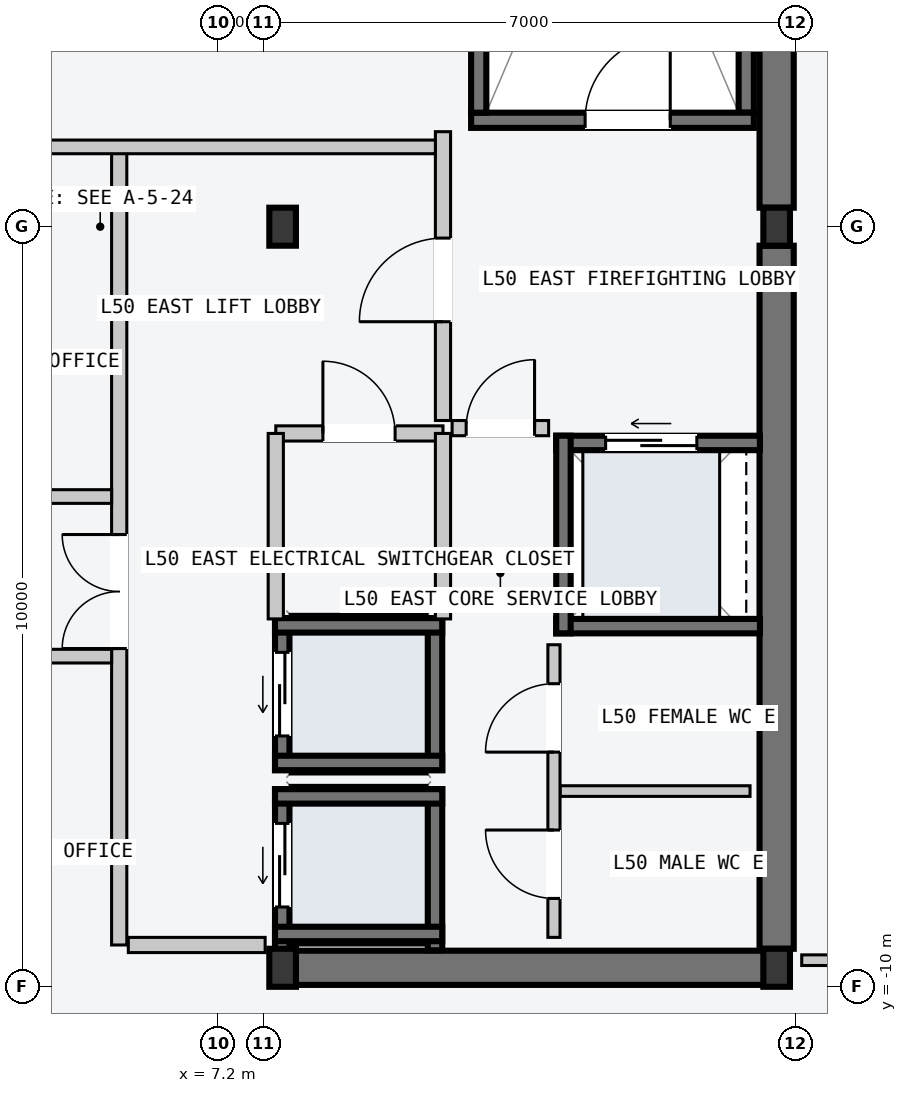
"""IFC4 building model, lengths in metres.
Left out: names, types, materials, properties, quantities, classifications, styles, units other than length and angle.
Written with IfcOpenShell. Run it as: python <this file> out.ifc"""

import sys

from ifc_helpers import new_model, si_unit, direction, frame, frame_2d, origin, origin_2d, place, context, subcontext, project, spatial, rectangle, i_section, extrude, element, fill, save


model = new_model("IFC4")
c1 = context("Model", 3, precision=1e-05, world=origin(), true_north=direction((0.0, 1.0)))
c2 = subcontext(c1, "Body", "Model", "MODEL_VIEW")
j1 = project(units=[si_unit("LENGTHUNIT", "METRE"), si_unit("PLANEANGLEUNIT", "RADIAN")], contexts=[c1])
p1 = place(None, origin())
s1 = spatial("IfcSite", under=j1, at=p1, CompositionType="ELEMENT")
p2 = place(p1, origin())
s2 = spatial("IfcBuilding", under=s1, at=p2, CompositionType="ELEMENT")
p3 = place(p2, frame((0.0, 0.0, 191.1)))
s3 = spatial("IfcBuildingStorey", under=s2, at=p3, CompositionType="ELEMENT", Elevation=191.1)
p4 = place(p3, frame((8.07, -9.75, -0.2), z_axis=(0.0, 0.0, 1.0), x_axis=(1.0, 0.0, 0.0)))
e1 = element("IfcWall", 1, at=p4, inside=s3, PredefinedType="SHEAR", context=c2, shape_type="SweptSolid", body=[
    extrude(rectangle(XDim=6.46, YDim=0.45, at=frame_2d((3.23, 0.0))), origin(), (0.0, 0.0, 1.0), 3.6),
])
for number, where, z_axis, x_axis in (
    (2, (14.55, -9.5, -0.2), (0.0, 0.0, 1.0), (0.0, 1.0, 0.0)),
    (3, (14.55, 0.25, -0.2), (0.0, 0.0, 1.0), (0.0, 1.0, 0.0)),
):
    element("IfcWall", number, at=place(p3, frame(where, z_axis=z_axis, x_axis=x_axis)), inside=s3, PredefinedType="SHEAR", context=c2, shape_type="SweptSolid", body=[
        extrude(rectangle(XDim=9.25, YDim=0.45, at=frame_2d((4.625, 0.0))), origin(), (0.0, 0.0, 1.0), 3.6),
    ])
p5 = place(p3, frame((14.15, 1.5, -0.2), z_axis=(0.0, 0.0, 1.0), x_axis=(0.0, 1.0, 0.0)))
e4 = element("IfcWall", 4, at=p5, inside=s3, PredefinedType="SOLIDWALL", context=c2, shape_type="SweptSolid", body=[
    extrude(rectangle(XDim=7.8, YDim=0.2, at=frame_2d((3.9, 0.0))), origin(), (0.0, 0.0, 1.0), 3.6),
])
p6 = place(p3, frame((10.53, 1.4, -0.2), z_axis=(0.0, 0.0, 1.0), x_axis=(1.0, 0.0, 0.0)))
e5 = element("IfcWall", 5, at=p6, inside=s3, PredefinedType="SOLIDWALL", context=c2, shape_type="SweptSolid", body=[
    extrude(rectangle(XDim=3.72, YDim=0.2, at=frame_2d((1.86, 0.0))), origin(), (0.0, 0.0, 1.0), 3.6),
])
p7 = place(p6, frame((1.5, 0.0, 0.2)))
e6 = element("IfcOpeningElement", 6, at=p7, cuts=e5, PredefinedType="OPENING", context=c2, shape_type="SweptSolid", body=[
    extrude(rectangle(XDim=1.12, YDim=2.18, at=frame_2d((0.56, 1.09))), frame((0.0, 0.11, 0.0), z_axis=(0.0, -1.0, 0.0), x_axis=(1.0, 0.0, 0.0)), (0.0, 0.0, 1.0), 0.22),
])
p8 = place(p3, frame((10.63, 1.5, -0.2), z_axis=(0.0, 0.0, 1.0), x_axis=(0.0, 1.0, 0.0)))
e7 = element("IfcWall", 7, at=p8, inside=s3, PredefinedType="SOLIDWALL", context=c2, shape_type="SweptSolid", body=[
    extrude(rectangle(XDim=7.8, YDim=0.2, at=frame_2d((3.9, 0.0))), origin(), (0.0, 0.0, 1.0), 3.6),
])
for number, where, z_axis, x_axis in (
    (8, (8.05, -9.75, 0.0), (0.0, 0.0, 1.0), (1.0, 0.0, 0.0)),
    (9, (8.05, 0.0, 0.0), (0.0, 0.0, 1.0), (1.0, 0.0, 0.0)),
    (10, (14.55, -9.75, 0.0), (0.0, 0.0, 1.0), (1.0, 0.0, 0.0)),
    (11, (14.55, 0.0, 0.0), (0.0, 0.0, 1.0), (1.0, 0.0, 0.0)),
):
    element("IfcColumn", number, at=place(p3, frame(where, z_axis=z_axis, x_axis=x_axis)), inside=s3, PredefinedType="COLUMN", context=c2, shape_type="SweptSolid", body=[
        extrude(i_section(OverallWidth=0.35, OverallDepth=0.5, WebThickness=0.02, FlangeThickness=0.032, at=origin_2d()), origin(), (0.0, 0.0, 1.0), 3.6),
    ])
p9 = place(p3, frame((8.045, -9.52, -0.2), z_axis=(0.0, 0.0, 1.0), x_axis=(0.0, 1.0, 0.0)))
e12 = element("IfcWall", 12, at=p9, inside=s3, PredefinedType="SOLIDWALL", context=c2, shape_type="SweptSolid", body=[
    extrude(rectangle(XDim=2.12, YDim=0.19, at=frame_2d((1.06, 0.0))), origin(), (0.0, 0.0, 1.0), 3.6),
])
p10 = place(p9, frame((0.57, 0.0, 0.2)))
e13 = element("IfcOpeningElement", 13, at=p10, cuts=e12, PredefinedType="OPENING", context=c2, shape_type="SweptSolid", body=[
    extrude(rectangle(XDim=1.1, YDim=2.2, at=frame_2d((0.55, 1.1))), frame((0.0, 0.105, 0.0), z_axis=(0.0, -1.0, 0.0), x_axis=(1.0, 0.0, 0.0)), (0.0, 0.0, 1.0), 0.21),
])
p11 = place(p3, frame((10.055, -9.52, -0.2), z_axis=(0.0, 0.0, 1.0), x_axis=(0.0, 1.0, 0.0)))
e14 = element("IfcWall", 14, at=p11, inside=s3, PredefinedType="SOLIDWALL", context=c2, shape_type="SweptSolid", body=[
    extrude(rectangle(XDim=2.12, YDim=0.19, at=frame_2d((1.06, 0.0))), origin(), (0.0, 0.0, 1.0), 3.6),
])
for number, where, z_axis, x_axis in (
    (15, (7.95, -7.495, -0.2), (0.0, 0.0, 1.0), (1.0, 0.0, 0.0)),
    (16, (7.95, -9.305, -0.2), (0.0, 0.0, 1.0), (1.0, 0.0, 0.0)),
):
    element("IfcWall", number, at=place(p3, frame(where, z_axis=z_axis, x_axis=x_axis)), inside=s3, PredefinedType="SOLIDWALL", context=c2, shape_type="SweptSolid", body=[
        extrude(rectangle(XDim=2.2, YDim=0.19, at=frame_2d((1.1, 0.0))), origin(), (0.0, 0.0, 1.0), 3.6),
    ])
p12 = place(p3, frame((8.045, -7.15, -0.2), z_axis=(0.0, 0.0, 1.0), x_axis=(0.0, 1.0, 0.0)))
e17 = element("IfcWall", 17, at=p12, inside=s3, PredefinedType="SOLIDWALL", context=c2, shape_type="SweptSolid", body=[
    extrude(rectangle(XDim=2.0, YDim=0.19, at=frame_2d((1.0, 0.0))), origin(), (0.0, 0.0, 1.0), 3.6),
])
p13 = place(p12, frame((0.45, 0.0, 0.2)))
e18 = element("IfcOpeningElement", 18, at=p13, cuts=e17, PredefinedType="OPENING", context=c2, shape_type="SweptSolid", body=[
    extrude(rectangle(XDim=1.1, YDim=2.2, at=frame_2d((0.55, 1.1))), frame((0.0, 0.105, 0.0), z_axis=(0.0, -1.0, 0.0), x_axis=(1.0, 0.0, 0.0)), (0.0, 0.0, 1.0), 0.21),
])
p14 = place(p3, frame((10.055, -7.15, -0.2), z_axis=(0.0, 0.0, 1.0), x_axis=(0.0, 1.0, 0.0)))
e19 = element("IfcWall", 19, at=p14, inside=s3, PredefinedType="SOLIDWALL", context=c2, shape_type="SweptSolid", body=[
    extrude(rectangle(XDim=2.0, YDim=0.19, at=frame_2d((1.0, 0.0))), origin(), (0.0, 0.0, 1.0), 3.6),
])
for number, where, z_axis, x_axis in (
    (20, (7.95, -5.245, -0.2), (0.0, 0.0, 1.0), (1.0, 0.0, 0.0)),
    (21, (7.95, -7.055, -0.2), (0.0, 0.0, 1.0), (1.0, 0.0, 0.0)),
):
    element("IfcWall", number, at=place(p3, frame(where, z_axis=z_axis, x_axis=x_axis)), inside=s3, PredefinedType="SOLIDWALL", context=c2, shape_type="SweptSolid", body=[
        extrude(rectangle(XDim=2.2, YDim=0.19, at=frame_2d((1.1, 0.0))), origin(), (0.0, 0.0, 1.0), 3.6),
    ])
p15 = place(p3, frame((11.65, -2.845, -0.2), z_axis=(0.0, 0.0, 1.0), x_axis=(1.0, 0.0, 0.0)))
e22 = element("IfcWall", 22, at=p15, inside=s3, PredefinedType="SOLIDWALL", context=c2, shape_type="SweptSolid", body=[
    extrude(rectangle(XDim=2.68, YDim=0.19, at=frame_2d((1.34, 0.0))), origin(), (0.0, 0.0, 1.0), 3.6),
])
p16 = place(p15, frame((0.65, 0.0, 0.2)))
e23 = element("IfcOpeningElement", 23, at=p16, cuts=e22, PredefinedType="OPENING", context=c2, shape_type="SweptSolid", body=[
    extrude(rectangle(XDim=1.2, YDim=2.2, at=frame_2d((0.6, 1.1))), frame((0.0, 0.105, 0.0), z_axis=(0.0, -1.0, 0.0), x_axis=(1.0, 0.0, 0.0)), (0.0, 0.0, 1.0), 0.21),
])
p17 = place(p3, frame((11.65, -5.255, -0.2), z_axis=(0.0, 0.0, 1.0), x_axis=(1.0, 0.0, 0.0)))
e24 = element("IfcWall", 24, at=p17, inside=s3, PredefinedType="SOLIDWALL", context=c2, shape_type="SweptSolid", body=[
    extrude(rectangle(XDim=2.68, YDim=0.19, at=frame_2d((1.34, 0.0))), origin(), (0.0, 0.0, 1.0), 3.6),
])
p18 = place(p3, frame((11.745, -5.35, -0.2), z_axis=(0.0, 0.0, 1.0), x_axis=(0.0, 1.0, 0.0)))
e25 = element("IfcWall", 25, at=p18, inside=s3, PredefinedType="SOLIDWALL", context=c2, shape_type="SweptSolid", body=[
    extrude(rectangle(XDim=2.6, YDim=0.19, at=frame_2d((1.3, 0.0))), origin(), (0.0, 0.0, 1.0), 3.6),
])
p19 = place(p3, frame((5.9, -9.45, 0.0), z_axis=(0.0, 0.0, 1.0), x_axis=(0.0, 1.0, 0.0)))
e26 = element("IfcWall", 26, at=p19, inside=s3, PredefinedType="PARTITIONING", context=c2, shape_type="SweptSolid", body=[
    extrude(rectangle(XDim=10.5, YDim=0.2, at=frame_2d((5.25, 0.0))), origin(), (0.0, 0.0, 1.0), 3.4),
])
p20 = place(p19, frame((3.9, 0.0, 0.0)))
e27 = element("IfcOpeningElement", 27, at=p20, cuts=e26, PredefinedType="OPENING", context=c2, shape_type="SweptSolid", body=[
    extrude(rectangle(XDim=1.5, YDim=2.2, at=frame_2d((0.75, 1.1))), frame((0.0, 0.11, 0.0), z_axis=(0.0, -1.0, 0.0), x_axis=(1.0, 0.0, 0.0)), (0.0, 0.0, 1.0), 0.22),
])
p21 = place(p3, frame((6.02, -9.45, 0.0), z_axis=(0.0, 0.0, 1.0), x_axis=(1.0, 0.0, 0.0)))
e28 = element("IfcWall", 28, at=p21, inside=s3, PredefinedType="PARTITIONING", context=c2, shape_type="SweptSolid", body=[
    extrude(rectangle(XDim=1.8, YDim=0.2, at=frame_2d((0.9, 0.0))), origin(), (0.0, 0.0, 1.0), 3.4),
])
p22 = place(p3, frame((10.16, -2.55, 0.0), z_axis=(0.0, 0.0, 1.0), x_axis=(0.0, 1.0, 0.0)))
e29 = element("IfcWall", 29, at=p22, inside=s3, PredefinedType="PARTITIONING", context=c2, shape_type="SweptSolid", body=[
    extrude(rectangle(XDim=3.8, YDim=0.2, at=frame_2d((1.9, 0.0))), origin(), (0.0, 0.0, 1.0), 3.4),
])
p23 = place(p22, frame((1.3, 0.0, 0.0)))
e30 = element("IfcOpeningElement", 30, at=p23, cuts=e29, PredefinedType="OPENING", context=c2, shape_type="SweptSolid", body=[
    extrude(rectangle(XDim=1.1, YDim=2.15, at=frame_2d((0.55, 1.075))), frame((0.0, 0.11, 0.0), z_axis=(0.0, -1.0, 0.0), x_axis=(1.0, 0.0, 0.0)), (0.0, 0.0, 1.0), 0.22),
])
p24 = place(p3, frame((10.28, -2.65, 0.0), z_axis=(0.0, 0.0, 1.0), x_axis=(1.0, 0.0, 0.0)))
e31 = element("IfcWall", 31, at=p24, inside=s3, PredefinedType="PARTITIONING", context=c2, shape_type="SweptSolid", body=[
    extrude(rectangle(XDim=1.27, YDim=0.2, at=frame_2d((0.635, 0.0))), origin(), (0.0, 0.0, 1.0), 3.4),
])
p25 = place(p24, frame((0.185, 0.0, 0.0)))
e32 = element("IfcOpeningElement", 32, at=p25, cuts=e31, PredefinedType="OPENING", context=c2, shape_type="SweptSolid", body=[
    extrude(rectangle(XDim=0.9, YDim=2.15, at=frame_2d((0.45, 1.075))), frame((0.0, 0.11, 0.0), z_axis=(0.0, -1.0, 0.0), x_axis=(1.0, 0.0, 0.0)), (0.0, 0.0, 1.0), 0.22),
])
p26 = place(p3, frame((7.96, -2.72, 0.0), z_axis=(0.0, 0.0, 1.0), x_axis=(1.0, 0.0, 0.0)))
e33 = element("IfcWall", 33, at=p26, inside=s3, PredefinedType="PARTITIONING", context=c2, shape_type="SweptSolid", body=[
    extrude(rectangle(XDim=2.2, YDim=0.2, at=frame_2d((1.1, 0.0))), origin(), (0.0, 0.0, 1.0), 3.4),
])
p27 = place(p26, frame((0.62, 0.0, 0.0)))
e34 = element("IfcOpeningElement", 34, at=p27, cuts=e33, PredefinedType="OPENING", context=c2, shape_type="SweptSolid", body=[
    extrude(rectangle(XDim=0.95, YDim=2.1, at=frame_2d((0.475, 1.05))), frame((0.0, 0.11, 0.0), z_axis=(0.0, -1.0, 0.0), x_axis=(1.0, 0.0, 0.0)), (0.0, 0.0, 1.0), 0.22),
])
for number, where, z_axis, x_axis in (
    (35, (7.96, -5.16, 0.0), (0.0, 0.0, 1.0), (0.0, 1.0, 0.0)),
    (36, (10.16, -5.16, 0.0), (0.0, 0.0, 1.0), (0.0, 1.0, 0.0)),
):
    element("IfcWall", number, at=place(p3, frame(where, z_axis=z_axis, x_axis=x_axis)), inside=s3, PredefinedType="PARTITIONING", context=c2, shape_type="SweptSolid", body=[
        extrude(rectangle(XDim=2.44, YDim=0.2, at=frame_2d((1.22, 0.0))), origin(), (0.0, 0.0, 1.0), 3.4),
    ])
p28 = place(p3, frame((11.7, -7.425, 0.0), z_axis=(0.0, 0.0, 1.0), x_axis=(1.0, 0.0, 0.0)))
e37 = element("IfcWall", 37, at=p28, inside=s3, PredefinedType="PARTITIONING", context=c2, shape_type="SweptSolid", body=[
    extrude(rectangle(XDim=2.5, YDim=0.14, at=frame_2d((1.25, 0.0))), origin(), (0.0, 0.0, 1.0), 3.4),
])
p29 = place(p3, frame((11.62, -9.35, 0.0), z_axis=(0.0, 0.0, 1.0), x_axis=(0.0, 1.0, 0.0)))
e38 = element("IfcWall", 38, at=p29, inside=s3, PredefinedType="PARTITIONING", context=c2, shape_type="SweptSolid", body=[
    extrude(rectangle(XDim=3.85, YDim=0.16, at=frame_2d((1.925, 0.0))), origin(), (0.0, 0.0, 1.0), 3.4),
])
p30 = place(p29, frame((0.512, 0.0, 0.0)))
e39 = element("IfcOpeningElement", 39, at=p30, cuts=e38, PredefinedType="OPENING", context=c2, shape_type="SweptSolid", body=[
    extrude(rectangle(XDim=0.9, YDim=2.15, at=frame_2d((0.45, 1.075))), frame((0.0, 0.09, 0.0), z_axis=(0.0, -1.0, 0.0), x_axis=(1.0, 0.0, 0.0)), (0.0, 0.0, 1.0), 0.18),
])
p31 = place(p29, frame((2.438, 0.0, 0.0)))
e40 = element("IfcOpeningElement", 40, at=p31, cuts=e38, PredefinedType="OPENING", context=c2, shape_type="SweptSolid", body=[
    extrude(rectangle(XDim=0.9, YDim=2.15, at=frame_2d((0.45, 1.075))), frame((0.0, 0.09, 0.0), z_axis=(0.0, -1.0, 0.0), x_axis=(1.0, 0.0, 0.0)), (0.0, 0.0, 1.0), 0.18),
])
p32 = place(p3, frame((1.26, 1.05, 0.0), z_axis=(0.0, 0.0, 1.0), x_axis=(1.0, 0.0, 0.0)))
e41 = element("IfcWall", 41, at=p32, inside=s3, PredefinedType="PARTITIONING", context=c2, shape_type="SweptSolid", body=[
    extrude(rectangle(XDim=8.8, YDim=0.18, at=frame_2d((4.4, 0.0))), origin(), (0.0, 0.0, 1.0), 3.4),
])
for number, where, z_axis, x_axis in (
    (42, (1.26, -3.55, 0.0), (0.0, 0.0, 1.0), (1.0, 0.0, 0.0)),
    (43, (1.26, -5.65, 0.0), (0.0, 0.0, 1.0), (1.0, 0.0, 0.0)),
):
    element("IfcWall", number, at=place(p3, frame(where, z_axis=z_axis, x_axis=x_axis)), inside=s3, PredefinedType="PARTITIONING", context=c2, shape_type="SweptSolid", body=[
        extrude(rectangle(XDim=4.54, YDim=0.18, at=frame_2d((2.27, 0.0))), origin(), (0.0, 0.0, 1.0), 3.4),
    ])
p33 = place(p3, frame((14.88, -9.65, 0.0), z_axis=(0.0, 0.0, 1.0), x_axis=(1.0, 0.0, 0.0)))
e44 = element("IfcWall", 44, at=p33, inside=s3, PredefinedType="PARTITIONING", context=c2, shape_type="SweptSolid", body=[
    extrude(rectangle(XDim=5.68, YDim=0.14, at=frame_2d((2.84, 0.0))), origin(), (0.0, 0.0, 1.0), 2.75),
])
p34 = place(p33, frame((2.36, 0.0, 0.0)))
e45 = element("IfcOpeningElement", 45, at=p34, cuts=e44, PredefinedType="OPENING", context=c2, shape_type="SweptSolid", body=[
    extrude(rectangle(XDim=0.96, YDim=2.18, at=frame_2d((0.48, 1.09))), frame((0.0, 0.08, 0.0), z_axis=(0.0, -1.0, 0.0), x_axis=(1.0, 0.0, 0.0)), (0.0, 0.0, 1.0), 0.16),
])
p35 = place(p7, origin())
e46 = element("IfcDoor", 46, at=p35, inside=s3, OperationType="SINGLE_SWING_RIGHT", PredefinedType="DOOR", context=c2, shape_type="SweptSolid", body=[
    extrude(rectangle(XDim=1.12, YDim=2.18, at=frame_2d((0.56, 1.09))), frame((0.0, 0.025, 0.0), z_axis=(0.0, -1.0, 0.0), x_axis=(1.0, 0.0, 0.0)), (0.0, 0.0, 1.0), 0.05),
])
fill(e6, e46)
p36 = place(p10, origin())
e47 = element("IfcDoor", 47, at=p36, inside=s3, OperationType="SLIDING_TO_LEFT", PredefinedType="DOOR", context=c2, shape_type="SweptSolid", body=[
    extrude(rectangle(XDim=1.1, YDim=2.2, at=frame_2d((0.55, 1.1))), frame((0.0, 0.025, 0.0), z_axis=(0.0, -1.0, 0.0), x_axis=(1.0, 0.0, 0.0)), (0.0, 0.0, 1.0), 0.05),
])
fill(e13, e47)
p37 = place(p13, origin())
e48 = element("IfcDoor", 48, at=p37, inside=s3, OperationType="SLIDING_TO_LEFT", PredefinedType="DOOR", context=c2, shape_type="SweptSolid", body=[
    extrude(rectangle(XDim=1.1, YDim=2.2, at=frame_2d((0.55, 1.1))), frame((0.0, 0.025, 0.0), z_axis=(0.0, -1.0, 0.0), x_axis=(1.0, 0.0, 0.0)), (0.0, 0.0, 1.0), 0.05),
])
fill(e18, e48)
p38 = place(p16, origin())
e49 = element("IfcDoor", 49, at=p38, inside=s3, OperationType="SLIDING_TO_LEFT", PredefinedType="DOOR", context=c2, shape_type="SweptSolid", body=[
    extrude(rectangle(XDim=1.2, YDim=2.2, at=frame_2d((0.6, 1.1))), frame((0.0, 0.025, 0.0), z_axis=(0.0, -1.0, 0.0), x_axis=(1.0, 0.0, 0.0)), (0.0, 0.0, 1.0), 0.05),
])
fill(e23, e49)
p39 = place(p20, origin())
e50 = element("IfcDoor", 50, at=p39, inside=s3, OperationType="DOUBLE_DOOR_SINGLE_SWING", PredefinedType="DOOR", context=c2, shape_type="SweptSolid", body=[
    extrude(rectangle(XDim=1.5, YDim=2.2, at=frame_2d((0.75, 1.1))), frame((0.0, 0.025, 0.0), z_axis=(0.0, -1.0, 0.0), x_axis=(1.0, 0.0, 0.0)), (0.0, 0.0, 1.0), 0.05),
])
fill(e27, e50)
p40 = place(p23, origin())
e51 = element("IfcDoor", 51, at=p40, inside=s3, OperationType="SINGLE_SWING_LEFT", PredefinedType="DOOR", context=c2, shape_type="SweptSolid", body=[
    extrude(rectangle(XDim=1.1, YDim=2.15, at=frame_2d((0.55, 1.075))), frame((0.0, 0.025, 0.0), z_axis=(0.0, -1.0, 0.0), x_axis=(1.0, 0.0, 0.0)), (0.0, 0.0, 1.0), 0.05),
])
fill(e30, e51)
p41 = place(p25, origin())
e52 = element("IfcDoor", 52, at=p41, inside=s3, OperationType="SINGLE_SWING_RIGHT", PredefinedType="DOOR", context=c2, shape_type="SweptSolid", body=[
    extrude(rectangle(XDim=0.9, YDim=2.15, at=frame_2d((0.45, 1.075))), frame((0.0, 0.025, 0.0), z_axis=(0.0, -1.0, 0.0), x_axis=(1.0, 0.0, 0.0)), (0.0, 0.0, 1.0), 0.05),
])
fill(e32, e52)
p42 = place(p27, origin())
e53 = element("IfcDoor", 53, at=p42, inside=s3, OperationType="SINGLE_SWING_LEFT", PredefinedType="DOOR", context=c2, shape_type="SweptSolid", body=[
    extrude(rectangle(XDim=0.95, YDim=2.1, at=frame_2d((0.475, 1.05))), frame((0.0, 0.025, 0.0), z_axis=(0.0, -1.0, 0.0), x_axis=(1.0, 0.0, 0.0)), (0.0, 0.0, 1.0), 0.05),
])
fill(e34, e53)
p43 = place(p30, origin())
e54 = element("IfcDoor", 54, at=p43, inside=s3, OperationType="SINGLE_SWING_RIGHT", PredefinedType="DOOR", context=c2, shape_type="SweptSolid", body=[
    extrude(rectangle(XDim=0.9, YDim=2.15, at=frame_2d((0.45, 1.075))), frame((0.0, 0.025, 0.0), z_axis=(0.0, -1.0, 0.0), x_axis=(1.0, 0.0, 0.0)), (0.0, 0.0, 1.0), 0.05),
])
fill(e39, e54)
p44 = place(p31, origin())
e55 = element("IfcDoor", 55, at=p44, inside=s3, OperationType="SINGLE_SWING_LEFT", PredefinedType="DOOR", context=c2, shape_type="SweptSolid", body=[
    extrude(rectangle(XDim=0.9, YDim=2.15, at=frame_2d((0.45, 1.075))), frame((0.0, 0.025, 0.0), z_axis=(0.0, -1.0, 0.0), x_axis=(1.0, 0.0, 0.0)), (0.0, 0.0, 1.0), 0.05),
])
fill(e40, e55)
save(model, sys.argv[1])
